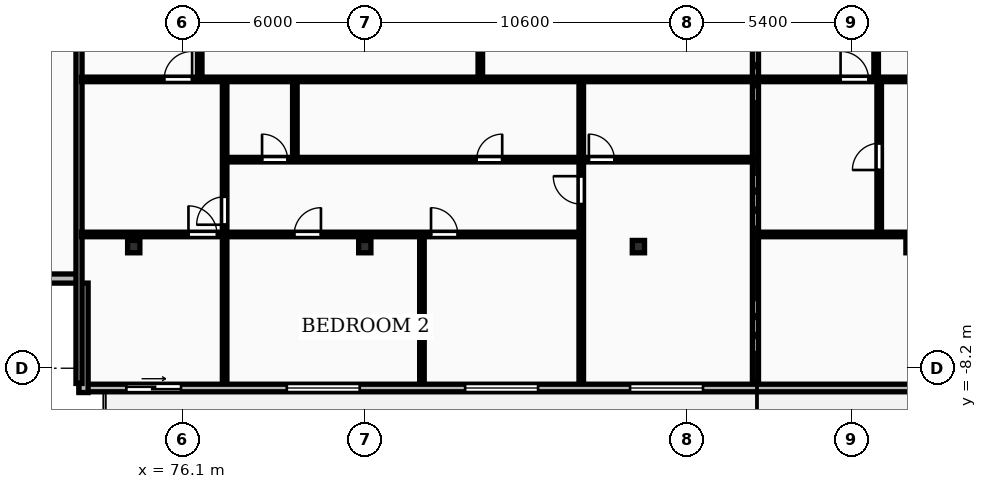
"""IFC4 building model, lengths in metres.
Left out: names, types, materials, properties, quantities, classifications, styles, units other than length and angle.
Written with IfcOpenShell. Run it as: python <this file> out.ifc"""

import sys

from ifc_helpers import new_model, si_unit, direction, frame, frame_2d, origin, origin_2d, place, context, subcontext, project, spatial, rectangle, i_section, extrude, element, fill, save


model = new_model("IFC4")
c1 = context("Model", 3, precision=1e-05, world=origin(), true_north=direction((0.0, 1.0)))
c2 = subcontext(c1, "Body", "Model", "MODEL_VIEW")
j1 = project(units=[si_unit("LENGTHUNIT", "METRE"), si_unit("PLANEANGLEUNIT", "RADIAN")], contexts=[c1])
p1 = place(None, origin())
s1 = spatial("IfcSite", under=j1, at=p1, CompositionType="ELEMENT")
p2 = place(p1, origin())
s2 = spatial("IfcBuilding", under=s1, at=p2, CompositionType="ELEMENT")
p3 = place(p2, frame((0.0, 0.0, 146.5)))
s3 = spatial("IfcBuildingStorey", under=s2, at=p3, CompositionType="ELEMENT", Elevation=146.5)
for number, where, z_axis, x_axis in (
    (1, (74.5, -4.2, 0.0), (0.0, 0.0, 1.0), (1.0, 0.0, 0.0)),
    (2, (82.1, -4.2, 0.0), (0.0, 0.0, 1.0), (1.0, 0.0, 0.0)),
    (3, (91.1, -4.2, 0.0), (0.0, 0.0, 1.0), (1.0, 0.0, 0.0)),
    (4, (100.1, -4.2, 0.0), (0.0, 0.0, 1.0), (1.0, 0.0, 0.0)),
):
    element("IfcColumn", number, at=place(p3, frame(where, z_axis=z_axis, x_axis=x_axis)), inside=s3, PredefinedType="COLUMN", context=c2, shape_type="SweptSolid", body=[
        extrude(i_section(OverallWidth=0.403, OverallDepth=0.406, WebThickness=0.027, FlangeThickness=0.043, FilletRadius=0.015, at=origin_2d()), origin(), (0.0, 0.0, 1.0), 3.6),
    ])
p4 = place(p3, frame((72.7, -8.85, 0.0), z_axis=(0.0, 0.0, 1.0), x_axis=(1.0, 0.0, 0.0)))
e5 = element("IfcWall", 5, at=p4, inside=s3, PredefinedType="STANDARD", context=c2, shape_type="SweptSolid", body=[
    extrude(rectangle(XDim=58.0, YDim=0.25, at=frame_2d((29.0, 0.0))), origin(), (0.0, 0.0, 1.0), 3.31),
])
p5 = place(p4, frame((6.835, 0.0, 0.85)))
e6 = element("IfcOpeningElement", 6, at=p5, cuts=e5, PredefinedType="OPENING", context=c2, shape_type="SweptSolid", body=[
    extrude(rectangle(XDim=2.4, YDim=1.9, at=frame_2d((1.2, 0.95))), frame((0.0, 0.135, 0.0), z_axis=(0.0, -1.0, 0.0), x_axis=(1.0, 0.0, 0.0)), (0.0, 0.0, 1.0), 0.27),
])
p6 = place(p4, frame((12.7, 0.0, 0.85)))
e7 = element("IfcOpeningElement", 7, at=p6, cuts=e5, PredefinedType="OPENING", context=c2, shape_type="SweptSolid", body=[
    extrude(rectangle(XDim=2.4, YDim=1.9, at=frame_2d((1.2, 0.95))), frame((0.0, 0.135, 0.0), z_axis=(0.0, -1.0, 0.0), x_axis=(1.0, 0.0, 0.0)), (0.0, 0.0, 1.0), 0.27),
])
p7 = place(p4, frame((1.555, 0.0, 0.0)))
e8 = element("IfcOpeningElement", 8, at=p7, cuts=e5, PredefinedType="OPENING", context=c2, shape_type="SweptSolid", body=[
    extrude(rectangle(XDim=1.8, YDim=2.2, at=frame_2d((0.9, 1.1))), frame((0.0, 0.135, 0.0), z_axis=(0.0, -1.0, 0.0), x_axis=(1.0, 0.0, 0.0)), (0.0, 0.0, 1.0), 0.27),
])
p8 = place(p4, frame((18.125, 0.0, 0.85)))
e9 = element("IfcOpeningElement", 9, at=p8, cuts=e5, PredefinedType="OPENING", context=c2, shape_type="SweptSolid", body=[
    extrude(rectangle(XDim=2.4, YDim=1.9, at=frame_2d((1.2, 0.95))), frame((0.0, 0.135, 0.0), z_axis=(0.0, -1.0, 0.0), x_axis=(1.0, 0.0, 0.0)), (0.0, 0.0, 1.0), 0.27),
])
p9 = place(p4, frame((27.429, 0.0, 0.0)))
e10 = element("IfcOpeningElement", 10, at=p9, cuts=e5, PredefinedType="OPENING", context=c2, shape_type="SweptSolid", body=[
    extrude(rectangle(XDim=1.8, YDim=2.2, at=frame_2d((0.9, 1.1))), frame((0.0, 0.135, 0.0), z_axis=(0.0, -1.0, 0.0), x_axis=(1.0, 0.0, 0.0)), (0.0, 0.0, 1.0), 0.27),
])
p10 = place(p4, frame((35.038, 0.0, 0.85)))
e11 = element("IfcOpeningElement", 11, at=p10, cuts=e5, PredefinedType="OPENING", context=c2, shape_type="SweptSolid", body=[
    extrude(rectangle(XDim=1.8, YDim=1.8, at=frame_2d((0.9, 0.9))), frame((0.0, 0.135, 0.0), z_axis=(0.0, -1.0, 0.0), x_axis=(1.0, 0.0, 0.0)), (0.0, 0.0, 1.0), 0.27),
])
p11 = place(p4, frame((43.541, 0.0, 0.85)))
e12 = element("IfcOpeningElement", 12, at=p11, cuts=e5, PredefinedType="OPENING", context=c2, shape_type="SweptSolid", body=[
    extrude(rectangle(XDim=2.4, YDim=1.9, at=frame_2d((1.2, 0.95))), frame((0.0, 0.135, 0.0), z_axis=(0.0, -1.0, 0.0), x_axis=(1.0, 0.0, 0.0)), (0.0, 0.0, 1.0), 0.27),
])
p12 = place(p4, frame((49.117, 0.0, 0.85)))
e13 = element("IfcOpeningElement", 13, at=p12, cuts=e5, PredefinedType="OPENING", context=c2, shape_type="SweptSolid", body=[
    extrude(rectangle(XDim=2.4, YDim=1.9, at=frame_2d((1.2, 0.95))), frame((0.0, 0.135, 0.0), z_axis=(0.0, -1.0, 0.0), x_axis=(1.0, 0.0, 0.0)), (0.0, 0.0, 1.0), 0.27),
])
p13 = place(p4, frame((39.053, 0.0, 0.0)))
e14 = element("IfcOpeningElement", 14, at=p13, cuts=e5, PredefinedType="OPENING", context=c2, shape_type="SweptSolid", body=[
    extrude(rectangle(XDim=1.8, YDim=2.2, at=frame_2d((0.9, 1.1))), frame((0.0, 0.135, 0.0), z_axis=(0.0, -1.0, 0.0), x_axis=(1.0, 0.0, 0.0)), (0.0, 0.0, 1.0), 0.27),
])
p14 = place(p4, frame((54.355, 0.0, 0.85)))
e15 = element("IfcOpeningElement", 15, at=p14, cuts=e5, PredefinedType="OPENING", context=c2, shape_type="SweptSolid", body=[
    extrude(rectangle(XDim=2.4, YDim=1.9, at=frame_2d((1.2, 0.95))), frame((0.0, 0.135, 0.0), z_axis=(0.0, -1.0, 0.0), x_axis=(1.0, 0.0, 0.0)), (0.0, 0.0, 1.0), 0.27),
])
p15 = place(p3, frame((69.1, -5.25, 0.0), z_axis=(0.0, 0.0, 1.0), x_axis=(1.0, 0.0, 0.0)))
e16 = element("IfcWall", 16, at=p15, inside=s3, PredefinedType="STANDARD", context=c2, shape_type="SweptSolid", body=[
    extrude(rectangle(XDim=3.6, YDim=0.3, at=frame_2d((1.8, 0.0))), origin(), (0.0, 0.0, 1.0), 3.31),
])
p16 = place(p3, frame((72.85, -5.4, 0.0), z_axis=(0.0, 0.0, 1.0), x_axis=(0.0, -1.0, 0.0)))
e17 = element("IfcWall", 17, at=p16, inside=s3, PredefinedType="STANDARD", context=c2, shape_type="SweptSolid", body=[
    extrude(rectangle(XDim=3.6, YDim=0.3, at=frame_2d((1.8, 0.0))), origin(), (0.0, 0.0, 1.0), 3.31),
])
for number, where, z_axis, x_axis in (
    (18, (72.7, -8.7, 0.0), (0.0, 0.0, 1.0), (0.0, 1.0, 0.0)),
    (19, (94.95, -8.7, 0.0), (0.0, 0.0, 1.0), (0.0, 1.0, 0.0)),
):
    element("IfcWall", number, at=place(p3, frame(where, z_axis=z_axis, x_axis=x_axis)), inside=s3, PredefinedType="PARTITIONING", context=c2, shape_type="SweptSolid", body=[
        extrude(rectangle(XDim=24.57, YDim=0.2, at=frame_2d((12.285, 0.0))), origin(), (0.0, 0.0, 1.0), 3.31),
    ])
p17 = place(p3, frame((85.9, 1.34, 0.0), z_axis=(0.0, 0.0, 1.0), x_axis=(0.0, 1.0, 0.0)))
e20 = element("IfcWall", 20, at=p17, inside=s3, PredefinedType="PARTITIONING", context=c2, shape_type="SweptSolid", body=[
    extrude(rectangle(XDim=14.55, YDim=0.15, at=frame_2d((7.275, 0.0))), origin(), (0.0, 0.0, 1.0), 3.31),
])
p18 = place(p17, frame((6.185, 0.0, 0.0)))
e21 = element("IfcOpeningElement", 21, at=p18, cuts=e20, PredefinedType="OPENING", context=c2, shape_type="SweptSolid", body=[
    extrude(rectangle(XDim=0.84, YDim=2.04, at=frame_2d((0.42, 1.02))), frame((0.0, 0.085, 0.0), z_axis=(0.0, -1.0, 0.0), x_axis=(1.0, 0.0, 0.0)), (0.0, 0.0, 1.0), 0.17),
])
p19 = place(p17, frame((7.525, 0.0, 0.0)))
e22 = element("IfcOpeningElement", 22, at=p19, cuts=e20, PredefinedType="OPENING", context=c2, shape_type="SweptSolid", body=[
    extrude(rectangle(XDim=0.88, YDim=2.06, at=frame_2d((0.44, 1.03))), frame((0.0, 0.085, 0.0), z_axis=(0.0, -1.0, 0.0), x_axis=(1.0, 0.0, 0.0)), (0.0, 0.0, 1.0), 0.17),
])
p20 = place(p3, frame((76.67, 1.34, 0.0), z_axis=(0.0, 0.0, 1.0), x_axis=(0.0, 1.0, 0.0)))
e23 = element("IfcWall", 23, at=p20, inside=s3, PredefinedType="PARTITIONING", context=c2, shape_type="SweptSolid", body=[
    extrude(rectangle(XDim=14.55, YDim=0.15, at=frame_2d((7.275, 0.0))), origin(), (0.0, 0.0, 1.0), 3.31),
])
p21 = place(p20, frame((3.132, 0.0, 0.0)))
e24 = element("IfcOpeningElement", 24, at=p21, cuts=e23, PredefinedType="OPENING", context=c2, shape_type="SweptSolid", body=[
    extrude(rectangle(XDim=0.88, YDim=2.06, at=frame_2d((0.44, 1.03))), frame((0.0, 0.085, 0.0), z_axis=(0.0, -1.0, 0.0), x_axis=(1.0, 0.0, 0.0)), (0.0, 0.0, 1.0), 0.17),
])
p22 = place(p3, frame((79.8, -1.32, 0.0), z_axis=(0.0, 0.0, 1.0), x_axis=(0.0, 1.0, 0.0)))
e25 = element("IfcWall", 25, at=p22, inside=s3, PredefinedType="PARTITIONING", context=c2, shape_type="SweptSolid", body=[
    extrude(rectangle(XDim=2.58, YDim=0.15, at=frame_2d((1.29, 0.0))), origin(), (0.0, 0.0, 1.0), 3.31),
])
p23 = place(p3, frame((83.98, -8.7, 0.0), z_axis=(0.0, 0.0, 1.0), x_axis=(0.0, 1.0, 0.0)))
e26 = element("IfcWall", 26, at=p23, inside=s3, PredefinedType="PARTITIONING", context=c2, shape_type="SweptSolid", body=[
    extrude(rectangle(XDim=4.82, YDim=0.15, at=frame_2d((2.41, 0.0))), origin(), (0.0, 0.0, 1.0), 3.31),
])
p24 = place(p3, frame((77.49, -8.7, 0.0), z_axis=(0.0, 0.0, 1.0), x_axis=(0.0, 1.0, 0.0)))
e27 = element("IfcWall", 27, at=p24, inside=s3, PredefinedType="PARTITIONING", context=c2, shape_type="SweptSolid", body=[
    extrude(rectangle(XDim=9.96, YDim=0.15, at=frame_2d((4.98, 0.0))), origin(), (0.0, 0.0, 1.0), 3.31),
])
p25 = place(p24, frame((5.22, 0.0, 0.0)))
e28 = element("IfcOpeningElement", 28, at=p25, cuts=e27, PredefinedType="OPENING", context=c2, shape_type="SweptSolid", body=[
    extrude(rectangle(XDim=0.92, YDim=2.08, at=frame_2d((0.46, 1.04))), frame((0.0, 0.085, 0.0), z_axis=(0.0, -1.0, 0.0), x_axis=(1.0, 0.0, 0.0)), (0.0, 0.0, 1.0), 0.17),
])
p26 = place(p3, frame((89.22, -1.32, 0.0), z_axis=(0.0, 0.0, 1.0), x_axis=(0.0, 1.0, 0.0)))
e29 = element("IfcWall", 29, at=p26, inside=s3, PredefinedType="PARTITIONING", context=c2, shape_type="SweptSolid", body=[
    extrude(rectangle(XDim=2.58, YDim=0.15, at=frame_2d((1.29, 0.0))), origin(), (0.0, 0.0, 1.0), 3.31),
])
p27 = place(p3, frame((89.22, -8.7, 0.0), z_axis=(0.0, 0.0, 1.0), x_axis=(0.0, 1.0, 0.0)))
e30 = element("IfcWall", 30, at=p27, inside=s3, PredefinedType="PARTITIONING", context=c2, shape_type="SweptSolid", body=[
    extrude(rectangle(XDim=7.34, YDim=0.15, at=frame_2d((3.67, 0.0))), origin(), (0.0, 0.0, 1.0), 3.31),
])
p28 = place(p27, frame((5.897, 0.0, 0.0)))
e31 = element("IfcOpeningElement", 31, at=p28, cuts=e30, PredefinedType="OPENING", context=c2, shape_type="SweptSolid", body=[
    extrude(rectangle(XDim=0.92, YDim=2.08, at=frame_2d((0.46, 1.04))), frame((0.0, 0.085, 0.0), z_axis=(0.0, -1.0, 0.0), x_axis=(1.0, 0.0, 0.0)), (0.0, 0.0, 1.0), 0.17),
])
p29 = place(p3, frame((77.53, -1.34, 0.0), z_axis=(0.0, 0.0, 1.0), x_axis=(1.0, 0.0, 0.0)))
e32 = element("IfcWall", 32, at=p29, inside=s3, PredefinedType="PARTITIONING", context=c2, shape_type="SweptSolid", body=[
    extrude(rectangle(XDim=17.34, YDim=0.15, at=frame_2d((8.67, 0.0))), origin(), (0.0, 0.0, 1.0), 3.31),
])
p30 = place(p29, frame((1.191, 0.0, 0.0)))
e33 = element("IfcOpeningElement", 33, at=p30, cuts=e32, PredefinedType="OPENING", context=c2, shape_type="SweptSolid", body=[
    extrude(rectangle(XDim=0.84, YDim=2.04, at=frame_2d((0.42, 1.02))), frame((0.0, 0.085, 0.0), z_axis=(0.0, -1.0, 0.0), x_axis=(1.0, 0.0, 0.0)), (0.0, 0.0, 1.0), 0.17),
])
p31 = place(p29, frame((8.25, 0.0, 0.0)))
e34 = element("IfcOpeningElement", 34, at=p31, cuts=e32, PredefinedType="OPENING", context=c2, shape_type="SweptSolid", body=[
    extrude(rectangle(XDim=0.84, YDim=2.04, at=frame_2d((0.42, 1.02))), frame((0.0, 0.085, 0.0), z_axis=(0.0, -1.0, 0.0), x_axis=(1.0, 0.0, 0.0)), (0.0, 0.0, 1.0), 0.17),
])
p32 = place(p29, frame((11.94, 0.0, 0.0)))
e35 = element("IfcOpeningElement", 35, at=p32, cuts=e32, PredefinedType="OPENING", context=c2, shape_type="SweptSolid", body=[
    extrude(rectangle(XDim=0.84, YDim=2.04, at=frame_2d((0.42, 1.02))), frame((0.0, 0.085, 0.0), z_axis=(0.0, -1.0, 0.0), x_axis=(1.0, 0.0, 0.0)), (0.0, 0.0, 1.0), 0.17),
])
p33 = place(p3, frame((72.78, 1.3, 0.0), z_axis=(0.0, 0.0, 1.0), x_axis=(1.0, 0.0, 0.0)))
e36 = element("IfcWall", 36, at=p33, inside=s3, PredefinedType="PARTITIONING", context=c2, shape_type="SweptSolid", body=[
    extrude(rectangle(XDim=22.09, YDim=0.15, at=frame_2d((11.045, 0.0))), origin(), (0.0, 0.0, 1.0), 3.31),
])
p34 = place(p33, frame((2.72, 0.0, 0.0)))
e37 = element("IfcOpeningElement", 37, at=p34, cuts=e36, PredefinedType="OPENING", context=c2, shape_type="SweptSolid", body=[
    extrude(rectangle(XDim=0.92, YDim=2.08, at=frame_2d((0.46, 1.04))), frame((0.0, 0.085, 0.0), z_axis=(0.0, -1.0, 0.0), x_axis=(1.0, 0.0, 0.0)), (0.0, 0.0, 1.0), 0.17),
])
p35 = place(p3, frame((72.78, -3.8, 0.0), z_axis=(0.0, 0.0, 1.0), x_axis=(1.0, 0.0, 0.0)))
e38 = element("IfcWall", 38, at=p35, inside=s3, PredefinedType="PARTITIONING", context=c2, shape_type="SweptSolid", body=[
    extrude(rectangle(XDim=16.44, YDim=0.15, at=frame_2d((8.22, 0.0))), origin(), (0.0, 0.0, 1.0), 3.31),
])
p36 = place(p35, frame((3.52, 0.0, 0.0)))
e39 = element("IfcOpeningElement", 39, at=p36, cuts=e38, PredefinedType="OPENING", context=c2, shape_type="SweptSolid", body=[
    extrude(rectangle(XDim=0.94, YDim=2.1, at=frame_2d((0.47, 1.05))), frame((0.0, 0.085, 0.0), z_axis=(0.0, -1.0, 0.0), x_axis=(1.0, 0.0, 0.0)), (0.0, 0.0, 1.0), 0.17),
])
p37 = place(p35, frame((6.998, 0.0, 0.0)))
e40 = element("IfcOpeningElement", 40, at=p37, cuts=e38, PredefinedType="OPENING", context=c2, shape_type="SweptSolid", body=[
    extrude(rectangle(XDim=0.88, YDim=2.06, at=frame_2d((0.44, 1.03))), frame((0.0, 0.085, 0.0), z_axis=(0.0, -1.0, 0.0), x_axis=(1.0, 0.0, 0.0)), (0.0, 0.0, 1.0), 0.17),
])
p38 = place(p35, frame((11.498, 0.0, 0.0)))
e41 = element("IfcOpeningElement", 41, at=p38, cuts=e38, PredefinedType="OPENING", context=c2, shape_type="SweptSolid", body=[
    extrude(rectangle(XDim=0.88, YDim=2.06, at=frame_2d((0.44, 1.03))), frame((0.0, 0.085, 0.0), z_axis=(0.0, -1.0, 0.0), x_axis=(1.0, 0.0, 0.0)), (0.0, 0.0, 1.0), 0.17),
])
p39 = place(p3, frame((98.92, 1.34, 0.0), z_axis=(0.0, 0.0, 1.0), x_axis=(0.0, 1.0, 0.0)))
e42 = element("IfcWall", 42, at=p39, inside=s3, PredefinedType="PARTITIONING", context=c2, shape_type="SweptSolid", body=[
    extrude(rectangle(XDim=14.55, YDim=0.15, at=frame_2d((7.275, 0.0))), origin(), (0.0, 0.0, 1.0), 3.31),
])
p40 = place(p39, frame((3.098, 0.0, 0.0)))
e43 = element("IfcOpeningElement", 43, at=p40, cuts=e42, PredefinedType="OPENING", context=c2, shape_type="SweptSolid", body=[
    extrude(rectangle(XDim=0.88, YDim=2.06, at=frame_2d((0.44, 1.03))), frame((0.0, 0.085, 0.0), z_axis=(0.0, -1.0, 0.0), x_axis=(1.0, 0.0, 0.0)), (0.0, 0.0, 1.0), 0.17),
])
p41 = place(p3, frame((99.02, -3.74, 0.0), z_axis=(0.0, 0.0, 1.0), x_axis=(0.0, 1.0, 0.0)))
e44 = element("IfcWall", 44, at=p41, inside=s3, PredefinedType="PARTITIONING", context=c2, shape_type="SweptSolid", body=[
    extrude(rectangle(XDim=5.0, YDim=0.15, at=frame_2d((2.5, 0.0))), origin(), (0.0, 0.0, 1.0), 3.31),
])
p42 = place(p41, frame((2.06, 0.0, 0.0)))
e45 = element("IfcOpeningElement", 45, at=p42, cuts=e44, PredefinedType="OPENING", context=c2, shape_type="SweptSolid", body=[
    extrude(rectangle(XDim=0.88, YDim=2.06, at=frame_2d((0.44, 1.03))), frame((0.0, 0.085, 0.0), z_axis=(0.0, -1.0, 0.0), x_axis=(1.0, 0.0, 0.0)), (0.0, 0.0, 1.0), 0.17),
])
p43 = place(p3, frame((95.03, 1.3, 0.0), z_axis=(0.0, 0.0, 1.0), x_axis=(1.0, 0.0, 0.0)))
e46 = element("IfcWall", 46, at=p43, inside=s3, PredefinedType="PARTITIONING", context=c2, shape_type="SweptSolid", body=[
    extrude(rectangle(XDim=15.298, YDim=0.15, at=frame_2d((7.649, 0.0))), origin(), (0.0, 0.0, 1.0), 3.31),
])
p44 = place(p43, frame((2.72, 0.0, 0.0)))
e47 = element("IfcOpeningElement", 47, at=p44, cuts=e46, PredefinedType="OPENING", context=c2, shape_type="SweptSolid", body=[
    extrude(rectangle(XDim=0.92, YDim=2.08, at=frame_2d((0.46, 1.04))), frame((0.0, 0.085, 0.0), z_axis=(0.0, -1.0, 0.0), x_axis=(1.0, 0.0, 0.0)), (0.0, 0.0, 1.0), 0.17),
])
p45 = place(p3, frame((95.03, -3.8, 0.0), z_axis=(0.0, 0.0, 1.0), x_axis=(1.0, 0.0, 0.0)))
e48 = element("IfcWall", 48, at=p45, inside=s3, PredefinedType="PARTITIONING", context=c2, shape_type="SweptSolid", body=[
    extrude(rectangle(XDim=15.298, YDim=0.15, at=frame_2d((7.649, 0.0))), origin(), (0.0, 0.0, 1.0), 3.31),
])
p46 = place(p45, frame((7.179, 0.0, 0.0)))
e49 = element("IfcOpeningElement", 49, at=p46, cuts=e48, PredefinedType="OPENING", context=c2, shape_type="SweptSolid", body=[
    extrude(rectangle(XDim=0.94, YDim=2.1, at=frame_2d((0.47, 1.05))), frame((0.0, 0.085, 0.0), z_axis=(0.0, -1.0, 0.0), x_axis=(1.0, 0.0, 0.0)), (0.0, 0.0, 1.0), 0.17),
])
p47 = place(p5, origin())
e50 = element("IfcWindow", 50, at=p47, inside=s3, PartitioningType="DOUBLE_PANEL_VERTICAL", PredefinedType="WINDOW", context=c2, shape_type="SweptSolid", body=[
    extrude(rectangle(XDim=2.4, YDim=1.9, at=frame_2d((1.2, 0.95))), frame((0.0, 0.03, 0.0), z_axis=(0.0, -1.0, 0.0), x_axis=(1.0, 0.0, 0.0)), (0.0, 0.0, 1.0), 0.06),
])
fill(e6, e50)
p48 = place(p6, origin())
e51 = element("IfcWindow", 51, at=p48, inside=s3, PartitioningType="DOUBLE_PANEL_VERTICAL", PredefinedType="WINDOW", context=c2, shape_type="SweptSolid", body=[
    extrude(rectangle(XDim=2.4, YDim=1.9, at=frame_2d((1.2, 0.95))), frame((0.0, 0.03, 0.0), z_axis=(0.0, -1.0, 0.0), x_axis=(1.0, 0.0, 0.0)), (0.0, 0.0, 1.0), 0.06),
])
fill(e7, e51)
p49 = place(p7, origin())
e52 = element("IfcDoor", 52, at=p49, inside=s3, OperationType="SLIDING_TO_RIGHT", PredefinedType="DOOR", context=c2, shape_type="SweptSolid", body=[
    extrude(rectangle(XDim=1.8, YDim=2.2, at=frame_2d((0.9, 1.1))), frame((0.0, 0.025, 0.0), z_axis=(0.0, -1.0, 0.0), x_axis=(1.0, 0.0, 0.0)), (0.0, 0.0, 1.0), 0.05),
])
fill(e8, e52)
p50 = place(p8, origin())
e53 = element("IfcWindow", 53, at=p50, inside=s3, PartitioningType="DOUBLE_PANEL_VERTICAL", PredefinedType="WINDOW", context=c2, shape_type="SweptSolid", body=[
    extrude(rectangle(XDim=2.4, YDim=1.9, at=frame_2d((1.2, 0.95))), frame((0.0, 0.03, 0.0), z_axis=(0.0, -1.0, 0.0), x_axis=(1.0, 0.0, 0.0)), (0.0, 0.0, 1.0), 0.06),
])
fill(e9, e53)
p51 = place(p25, origin())
e54 = element("IfcDoor", 54, at=p51, inside=s3, OperationType="SINGLE_SWING_LEFT", PredefinedType="DOOR", context=c2, shape_type="SweptSolid", body=[
    extrude(rectangle(XDim=0.92, YDim=2.08, at=frame_2d((0.46, 1.04))), frame((0.0, 0.025, 0.0), z_axis=(0.0, -1.0, 0.0), x_axis=(1.0, 0.0, 0.0)), (0.0, 0.0, 1.0), 0.05),
])
fill(e28, e54)
p52 = place(p28, origin())
e55 = element("IfcDoor", 55, at=p52, inside=s3, OperationType="SINGLE_SWING_RIGHT", PredefinedType="DOOR", context=c2, shape_type="SweptSolid", body=[
    extrude(rectangle(XDim=0.92, YDim=2.08, at=frame_2d((0.46, 1.04))), frame((0.0, 0.025, 0.0), z_axis=(0.0, -1.0, 0.0), x_axis=(1.0, 0.0, 0.0)), (0.0, 0.0, 1.0), 0.05),
])
fill(e31, e55)
p53 = place(p30, origin())
e56 = element("IfcDoor", 56, at=p53, inside=s3, OperationType="SINGLE_SWING_LEFT", PredefinedType="DOOR", context=c2, shape_type="SweptSolid", body=[
    extrude(rectangle(XDim=0.84, YDim=2.04, at=frame_2d((0.42, 1.02))), frame((0.0, 0.025, 0.0), z_axis=(0.0, -1.0, 0.0), x_axis=(1.0, 0.0, 0.0)), (0.0, 0.0, 1.0), 0.05),
])
fill(e33, e56)
p54 = place(p31, origin())
e57 = element("IfcDoor", 57, at=p54, inside=s3, OperationType="SINGLE_SWING_RIGHT", PredefinedType="DOOR", context=c2, shape_type="SweptSolid", body=[
    extrude(rectangle(XDim=0.84, YDim=2.04, at=frame_2d((0.42, 1.02))), frame((0.0, 0.025, 0.0), z_axis=(0.0, -1.0, 0.0), x_axis=(1.0, 0.0, 0.0)), (0.0, 0.0, 1.0), 0.05),
])
fill(e34, e57)
p55 = place(p32, origin())
e58 = element("IfcDoor", 58, at=p55, inside=s3, OperationType="SINGLE_SWING_LEFT", PredefinedType="DOOR", context=c2, shape_type="SweptSolid", body=[
    extrude(rectangle(XDim=0.84, YDim=2.04, at=frame_2d((0.42, 1.02))), frame((0.0, 0.025, 0.0), z_axis=(0.0, -1.0, 0.0), x_axis=(1.0, 0.0, 0.0)), (0.0, 0.0, 1.0), 0.05),
])
fill(e35, e58)
p56 = place(p34, origin())
e59 = element("IfcDoor", 59, at=p56, inside=s3, OperationType="SINGLE_SWING_RIGHT", PredefinedType="DOOR", context=c2, shape_type="SweptSolid", body=[
    extrude(rectangle(XDim=0.92, YDim=2.08, at=frame_2d((0.46, 1.04))), frame((0.0, 0.025, 0.0), z_axis=(0.0, -1.0, 0.0), x_axis=(1.0, 0.0, 0.0)), (0.0, 0.0, 1.0), 0.05),
])
fill(e37, e59)
p57 = place(p36, origin())
e60 = element("IfcDoor", 60, at=p57, inside=s3, OperationType="SINGLE_SWING_LEFT", PredefinedType="DOOR", context=c2, shape_type="SweptSolid", body=[
    extrude(rectangle(XDim=0.94, YDim=2.1, at=frame_2d((0.47, 1.05))), frame((0.0, 0.025, 0.0), z_axis=(0.0, -1.0, 0.0), x_axis=(1.0, 0.0, 0.0)), (0.0, 0.0, 1.0), 0.05),
])
fill(e39, e60)
p58 = place(p37, origin())
e61 = element("IfcDoor", 61, at=p58, inside=s3, OperationType="SINGLE_SWING_RIGHT", PredefinedType="DOOR", context=c2, shape_type="SweptSolid", body=[
    extrude(rectangle(XDim=0.88, YDim=2.06, at=frame_2d((0.44, 1.03))), frame((0.0, 0.025, 0.0), z_axis=(0.0, -1.0, 0.0), x_axis=(1.0, 0.0, 0.0)), (0.0, 0.0, 1.0), 0.05),
])
fill(e40, e61)
p59 = place(p38, origin())
e62 = element("IfcDoor", 62, at=p59, inside=s3, OperationType="SINGLE_SWING_LEFT", PredefinedType="DOOR", context=c2, shape_type="SweptSolid", body=[
    extrude(rectangle(XDim=0.88, YDim=2.06, at=frame_2d((0.44, 1.03))), frame((0.0, 0.025, 0.0), z_axis=(0.0, -1.0, 0.0), x_axis=(1.0, 0.0, 0.0)), (0.0, 0.0, 1.0), 0.05),
])
fill(e41, e62)
p60 = place(p42, origin())
e63 = element("IfcDoor", 63, at=p60, inside=s3, OperationType="SINGLE_SWING_LEFT", PredefinedType="DOOR", context=c2, shape_type="SweptSolid", body=[
    extrude(rectangle(XDim=0.88, YDim=2.06, at=frame_2d((0.44, 1.03))), frame((0.0, 0.025, 0.0), z_axis=(0.0, -1.0, 0.0), x_axis=(1.0, 0.0, 0.0)), (0.0, 0.0, 1.0), 0.05),
])
fill(e45, e63)
p61 = place(p44, origin())
e64 = element("IfcDoor", 64, at=p61, inside=s3, OperationType="SINGLE_SWING_LEFT", PredefinedType="DOOR", context=c2, shape_type="SweptSolid", body=[
    extrude(rectangle(XDim=0.92, YDim=2.08, at=frame_2d((0.46, 1.04))), frame((0.0, 0.025, 0.0), z_axis=(0.0, -1.0, 0.0), x_axis=(1.0, 0.0, 0.0)), (0.0, 0.0, 1.0), 0.05),
])
fill(e47, e64)
save(model, sys.argv[1])
